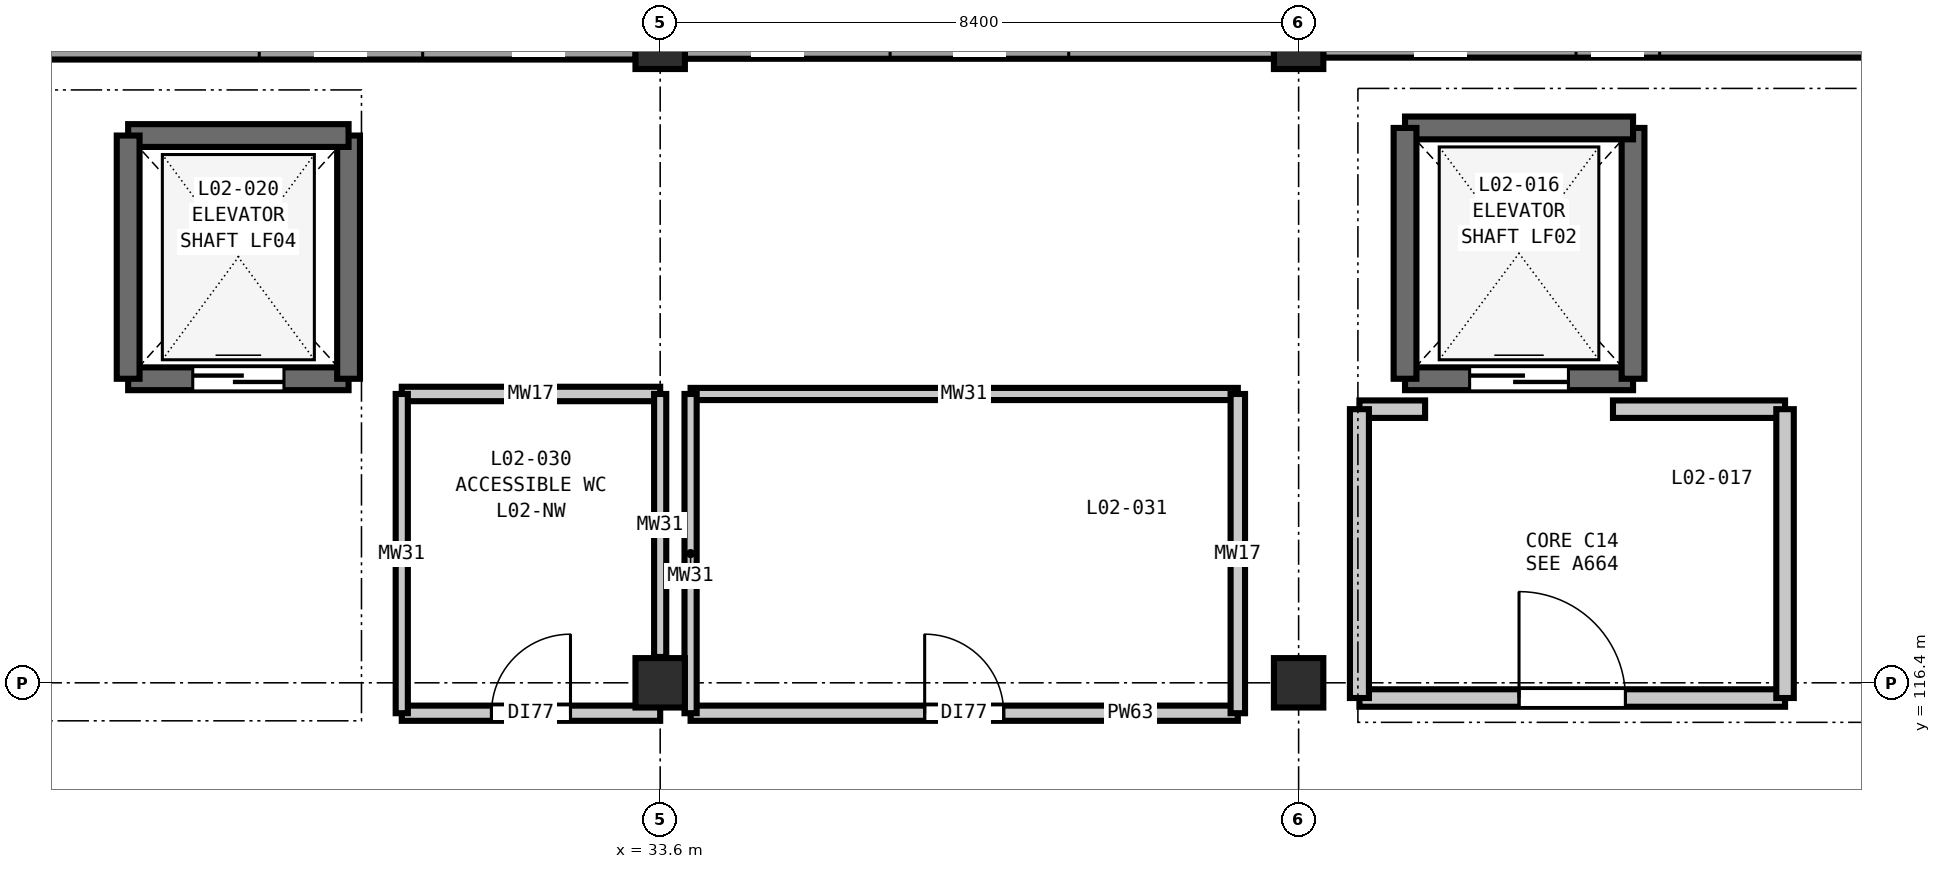
"""IFC4 building model, lengths in metres.
Left out: names, types, materials, properties, quantities, classifications, styles, units other than length and angle.
Written with IfcOpenShell. Run it as: python <this file> out.ifc"""

import sys

from ifc_helpers import new_model, si_unit, direction, frame, frame_2d, origin, origin_2d, place, context, subcontext, project, spatial, rectangle, extrude, element, fill, save


model = new_model("IFC4")
c1 = context("Model", 3, precision=1e-05, world=origin(), true_north=direction((0.0, 1.0)))
c2 = subcontext(c1, "Body", "Model", "MODEL_VIEW")
j1 = project(units=[si_unit("LENGTHUNIT", "METRE"), si_unit("PLANEANGLEUNIT", "RADIAN")], contexts=[c1])
p1 = place(None, origin())
s1 = spatial("IfcSite", under=j1, at=p1, CompositionType="ELEMENT")
p2 = place(p1, origin())
s2 = spatial("IfcBuilding", under=s1, at=p2, CompositionType="ELEMENT")
p3 = place(p2, frame((0.0, 0.0, 10.8)))
s3 = spatial("IfcBuildingStorey", under=s2, at=p3, CompositionType="ELEMENT", Elevation=10.8)
for number, where, z_axis, x_axis in (
    (1, (33.6, 116.4, 0.0), (0.0, 0.0, 1.0), (1.0, 0.0, 0.0)),
    (2, (33.6, 124.8, 0.0), (0.0, 0.0, 1.0), (1.0, 0.0, 0.0)),
    (3, (42.0, 116.4, 0.0), (0.0, 0.0, 1.0), (1.0, 0.0, 0.0)),
    (4, (42.0, 124.8, 0.0), (0.0, 0.0, 1.0), (1.0, 0.0, 0.0)),
):
    element("IfcColumn", number, at=place(p3, frame(where, z_axis=z_axis, x_axis=x_axis)), inside=s3, PredefinedType="COLUMN", context=c2, shape_type="SweptSolid", body=[
        extrude(rectangle(XDim=0.65, YDim=0.65, at=origin_2d()), origin(), (0.0, 0.0, 1.0), 5.4),
    ])
p4 = place(p3, frame((25.523, 124.8, 0.0), z_axis=(0.0, 0.0, 1.0), x_axis=(1.0, 0.0, 0.0)))
e5 = element("IfcWall", 5, at=p4, inside=s3, PredefinedType="SOLIDWALL", context=c2, shape_type="SweptSolid", body=[
    extrude(rectangle(XDim=7.754, YDim=0.4, at=frame_2d((3.877, 0.0))), origin(), (0.0, 0.0, 1.0), 4.68),
])
p5 = place(p4, frame((2.802, 0.0, 0.9)))
e6 = element("IfcOpeningElement", 6, at=p5, cuts=e5, PredefinedType="OPENING", context=c2, shape_type="SweptSolid", body=[
    extrude(rectangle(XDim=2.15, YDim=1.75, at=frame_2d((1.075, 0.875))), frame((0.0, 0.21, 0.0), z_axis=(0.0, -1.0, 0.0), x_axis=(1.0, 0.0, 0.0)), (0.0, 0.0, 1.0), 0.42),
])
p6 = place(p3, frame((33.923, 124.8, 0.0), z_axis=(0.0, 0.0, 1.0), x_axis=(1.0, 0.0, 0.0)))
e7 = element("IfcWall", 7, at=p6, inside=s3, PredefinedType="SOLIDWALL", context=c2, shape_type="SweptSolid", body=[
    extrude(rectangle(XDim=7.754, YDim=0.38, at=frame_2d((3.877, 0.0))), origin(), (0.0, 0.0, 1.0), 4.68),
])
p7 = place(p6, frame((2.702, 0.0, 0.9)))
e8 = element("IfcOpeningElement", 8, at=p7, cuts=e7, PredefinedType="OPENING", context=c2, shape_type="SweptSolid", body=[
    extrude(rectangle(XDim=2.35, YDim=1.75, at=frame_2d((1.175, 0.875))), frame((0.0, 0.2, 0.0), z_axis=(0.0, -1.0, 0.0), x_axis=(1.0, 0.0, 0.0)), (0.0, 0.0, 1.0), 0.4),
])
p8 = place(p3, frame((42.323, 124.8, 0.0), z_axis=(0.0, 0.0, 1.0), x_axis=(1.0, 0.0, 0.0)))
e9 = element("IfcWall", 9, at=p8, inside=s3, PredefinedType="SOLIDWALL", context=c2, shape_type="SweptSolid", body=[
    extrude(rectangle(XDim=7.754, YDim=0.35, at=frame_2d((3.877, 0.0))), origin(), (0.0, 0.0, 1.0), 4.68),
])
p9 = place(p8, frame((3.327, 0.0, 0.9)))
e10 = element("IfcOpeningElement", 10, at=p9, cuts=e9, PredefinedType="OPENING", context=c2, shape_type="SweptSolid", body=[
    extrude(rectangle(XDim=1.1, YDim=1.95, at=frame_2d((0.55, 0.975))), frame((0.0, 0.185, 0.0), z_axis=(0.0, -1.0, 0.0), x_axis=(1.0, 0.0, 0.0)), (0.0, 0.0, 1.0), 0.37),
])
p10 = place(p3, frame((43.4, 120.4, 0.0), z_axis=(0.0, 0.0, 1.0), x_axis=(1.0, 0.0, 0.0)))
e11 = element("IfcWall", 11, at=p10, inside=s3, PredefinedType="SHEAR", context=c2, shape_type="SweptSolid", body=[
    extrude(rectangle(XDim=3.0, YDim=0.3, at=frame_2d((1.5, 0.0))), origin(), (0.0, 0.0, 1.0), 5.4),
])
p11 = place(p10, frame((0.85, 0.0, 0.0)))
e12 = element("IfcOpeningElement", 12, at=p11, cuts=e11, PredefinedType="OPENING", context=c2, shape_type="SweptSolid", body=[
    extrude(rectangle(XDim=1.3, YDim=2.2, at=frame_2d((0.65, 1.1))), frame((0.0, 0.16, 0.0), z_axis=(0.0, -1.0, 0.0), x_axis=(1.0, 0.0, 0.0)), (0.0, 0.0, 1.0), 0.32),
])
p12 = place(p3, frame((46.4, 120.4, 0.0), z_axis=(0.0, 0.0, 1.0), x_axis=(0.0, 1.0, 0.0)))
e13 = element("IfcWall", 13, at=p12, inside=s3, PredefinedType="SHEAR", context=c2, shape_type="SweptSolid", body=[
    extrude(rectangle(XDim=3.3, YDim=0.3, at=frame_2d((1.65, 0.0))), origin(), (0.0, 0.0, 1.0), 5.4),
])
p13 = place(p3, frame((46.4, 123.7, 0.0), z_axis=(0.0, 0.0, 1.0), x_axis=(-1.0, 0.0, 0.0)))
e14 = element("IfcWall", 14, at=p13, inside=s3, PredefinedType="SHEAR", context=c2, shape_type="SweptSolid", body=[
    extrude(rectangle(XDim=3.0, YDim=0.3, at=frame_2d((1.5, 0.0))), origin(), (0.0, 0.0, 1.0), 5.4),
])
p14 = place(p3, frame((43.4, 123.7, 0.0), z_axis=(0.0, 0.0, 1.0), x_axis=(0.0, -1.0, 0.0)))
e15 = element("IfcWall", 15, at=p14, inside=s3, PredefinedType="SHEAR", context=c2, shape_type="SweptSolid", body=[
    extrude(rectangle(XDim=3.3, YDim=0.3, at=frame_2d((1.65, 0.0))), origin(), (0.0, 0.0, 1.0), 5.4),
])
p15 = place(p3, frame((26.6, 120.4, 0.0), z_axis=(0.0, 0.0, 1.0), x_axis=(1.0, 0.0, 0.0)))
e16 = element("IfcWall", 16, at=p15, inside=s3, PredefinedType="SHEAR", context=c2, shape_type="SweptSolid", body=[
    extrude(rectangle(XDim=2.9, YDim=0.3, at=frame_2d((1.45, 0.0))), origin(), (0.0, 0.0, 1.0), 5.4),
])
p16 = place(p15, frame((0.85, 0.0, 0.0)))
e17 = element("IfcOpeningElement", 17, at=p16, cuts=e16, PredefinedType="OPENING", context=c2, shape_type="SweptSolid", body=[
    extrude(rectangle(XDim=1.2, YDim=2.2, at=frame_2d((0.6, 1.1))), frame((0.0, 0.16, 0.0), z_axis=(0.0, -1.0, 0.0), x_axis=(1.0, 0.0, 0.0)), (0.0, 0.0, 1.0), 0.32),
])
p17 = place(p3, frame((29.5, 120.4, 0.0), z_axis=(0.0, 0.0, 1.0), x_axis=(0.0, 1.0, 0.0)))
e18 = element("IfcWall", 18, at=p17, inside=s3, PredefinedType="SHEAR", context=c2, shape_type="SweptSolid", body=[
    extrude(rectangle(XDim=3.2, YDim=0.3, at=frame_2d((1.6, 0.0))), origin(), (0.0, 0.0, 1.0), 5.4),
])
p18 = place(p3, frame((29.5, 123.6, 0.0), z_axis=(0.0, 0.0, 1.0), x_axis=(-1.0, 0.0, 0.0)))
e19 = element("IfcWall", 19, at=p18, inside=s3, PredefinedType="SHEAR", context=c2, shape_type="SweptSolid", body=[
    extrude(rectangle(XDim=2.9, YDim=0.3, at=frame_2d((1.45, 0.0))), origin(), (0.0, 0.0, 1.0), 5.4),
])
p19 = place(p3, frame((26.6, 123.6, 0.0), z_axis=(0.0, 0.0, 1.0), x_axis=(0.0, -1.0, 0.0)))
e20 = element("IfcWall", 20, at=p19, inside=s3, PredefinedType="SHEAR", context=c2, shape_type="SweptSolid", body=[
    extrude(rectangle(XDim=3.2, YDim=0.3, at=frame_2d((1.6, 0.0))), origin(), (0.0, 0.0, 1.0), 5.4),
])
p20 = place(p3, frame((30.2, 116.0, 0.0), z_axis=(0.0, 0.0, 1.0), x_axis=(1.0, 0.0, 0.0)))
e21 = element("IfcWall", 21, at=p20, inside=s3, PredefinedType="PARTITIONING", context=c2, shape_type="SweptSolid", body=[
    extrude(rectangle(XDim=3.4, YDim=0.2, at=frame_2d((1.7, 0.0))), origin(), (0.0, 0.0, 1.0), 5.07),
])
p21 = place(p20, frame((1.18, 0.0, 0.0)))
e22 = element("IfcOpeningElement", 22, at=p21, cuts=e21, PredefinedType="OPENING", context=c2, shape_type="SweptSolid", body=[
    extrude(rectangle(XDim=1.04, YDim=2.1, at=frame_2d((0.52, 1.05))), frame((0.0, 0.11, 0.0), z_axis=(0.0, -1.0, 0.0), x_axis=(1.0, 0.0, 0.0)), (0.0, 0.0, 1.0), 0.22),
])
p22 = place(p3, frame((34.0, 116.0, 0.0), z_axis=(0.0, 0.0, 1.0), x_axis=(1.0, 0.0, 0.0)))
e23 = element("IfcWall", 23, at=p22, inside=s3, PredefinedType="PARTITIONING", context=c2, shape_type="SweptSolid", body=[
    extrude(rectangle(XDim=7.2, YDim=0.2, at=frame_2d((3.6, 0.0))), origin(), (0.0, 0.0, 1.0), 5.07),
])
p23 = place(p22, frame((3.08, 0.0, 0.0)))
e24 = element("IfcOpeningElement", 24, at=p23, cuts=e23, PredefinedType="OPENING", context=c2, shape_type="SweptSolid", body=[
    extrude(rectangle(XDim=1.04, YDim=2.1, at=frame_2d((0.52, 1.05))), frame((0.0, 0.11, 0.0), z_axis=(0.0, -1.0, 0.0), x_axis=(1.0, 0.0, 0.0)), (0.0, 0.0, 1.0), 0.22),
])
p24 = place(p3, frame((42.8, 116.2, 0.0), z_axis=(0.0, 0.0, 1.0), x_axis=(1.0, 0.0, 0.0)))
e25 = element("IfcWall", 25, at=p24, inside=s3, PredefinedType="PARTITIONING", context=c2, shape_type="SweptSolid", body=[
    extrude(rectangle(XDim=5.6, YDim=0.23, at=frame_2d((2.8, 0.0))), origin(), (0.0, 0.0, 1.0), 4.735),
])
p25 = place(p24, frame((2.1, 0.0, 0.0)))
e26 = element("IfcOpeningElement", 26, at=p25, cuts=e25, PredefinedType="OPENING", context=c2, shape_type="SweptSolid", body=[
    extrude(rectangle(XDim=1.4, YDim=2.2, at=frame_2d((0.7, 1.1))), frame((0.0, 0.125, 0.0), z_axis=(0.0, -1.0, 0.0), x_axis=(1.0, 0.0, 0.0)), (0.0, 0.0, 1.0), 0.25),
])
p26 = place(p3, frame((46.136, 120.0, 0.0), z_axis=(0.0, 0.0, 1.0), x_axis=(1.0, 0.0, 0.0)))
e27 = element("IfcWall", 27, at=p26, inside=s3, PredefinedType="PARTITIONING", context=c2, shape_type="SweptSolid", body=[
    extrude(rectangle(XDim=2.264, YDim=0.23, at=frame_2d((1.132, 0.0))), origin(), (0.0, 0.0, 1.0), 5.07),
])
p27 = place(p3, frame((42.8, 120.0, 0.0), z_axis=(0.0, 0.0, 1.0), x_axis=(1.0, 0.0, 0.0)))
e28 = element("IfcWall", 28, at=p27, inside=s3, PredefinedType="PARTITIONING", context=c2, shape_type="SweptSolid", body=[
    extrude(rectangle(XDim=0.864, YDim=0.23, at=frame_2d((0.432, 0.0))), origin(), (0.0, 0.0, 1.0), 5.07),
])
p28 = place(p3, frame((30.2, 120.2, 0.0), z_axis=(0.0, 0.0, 1.0), x_axis=(1.0, 0.0, 0.0)))
e29 = element("IfcWall", 29, at=p28, inside=s3, PredefinedType="PLUMBINGWALL", context=c2, shape_type="SweptSolid", body=[
    extrude(rectangle(XDim=3.4, YDim=0.19, at=frame_2d((1.7, 0.0))), origin(), (0.0, 0.0, 1.0), 5.07),
])
p29 = place(p3, frame((34.0, 120.2, 0.0), z_axis=(0.0, 0.0, 1.0), x_axis=(1.0, 0.0, 0.0)))
e30 = element("IfcWall", 30, at=p29, inside=s3, PredefinedType="PLUMBINGWALL", context=c2, shape_type="SweptSolid", body=[
    extrude(rectangle(XDim=7.2, YDim=0.16, at=frame_2d((3.6, 0.0))), origin(), (0.0, 0.0, 1.0), 5.07),
])
p30 = place(p3, frame((30.2, 116.0, 0.0), z_axis=(0.0, 0.0, 1.0), x_axis=(0.0, 1.0, 0.0)))
e31 = element("IfcWall", 31, at=p30, inside=s3, PredefinedType="PLUMBINGWALL", context=c2, shape_type="SweptSolid", body=[
    extrude(rectangle(XDim=4.2, YDim=0.16, at=frame_2d((2.1, 0.0))), origin(), (0.0, 0.0, 1.0), 5.07),
])
p31 = place(p3, frame((33.6, 116.74, 0.0), z_axis=(0.0, 0.0, 1.0), x_axis=(0.0, 1.0, 0.0)))
e32 = element("IfcWall", 32, at=p31, inside=s3, PredefinedType="PLUMBINGWALL", context=c2, shape_type="SweptSolid", body=[
    extrude(rectangle(XDim=3.46, YDim=0.16, at=frame_2d((1.73, 0.0))), origin(), (0.0, 0.0, 1.0), 4.735),
])
p32 = place(p3, frame((34.0, 116.0, 0.0), z_axis=(0.0, 0.0, 1.0), x_axis=(0.0, 1.0, 0.0)))
e33 = element("IfcWall", 33, at=p32, inside=s3, PredefinedType="PLUMBINGWALL", context=c2, shape_type="SweptSolid", body=[
    extrude(rectangle(XDim=4.2, YDim=0.16, at=frame_2d((2.1, 0.0))), origin(), (0.0, 0.0, 1.0), 5.07),
])
p33 = place(p3, frame((41.2, 116.0, 0.0), z_axis=(0.0, 0.0, 1.0), x_axis=(0.0, 1.0, 0.0)))
e34 = element("IfcWall", 34, at=p33, inside=s3, PredefinedType="PLUMBINGWALL", context=c2, shape_type="SweptSolid", body=[
    extrude(rectangle(XDim=4.2, YDim=0.19, at=frame_2d((2.1, 0.0))), origin(), (0.0, 0.0, 1.0), 5.07),
])
p34 = place(p3, frame((42.8, 116.2, 0.0), z_axis=(0.0, 0.0, 1.0), x_axis=(0.0, 1.0, 0.0)))
e35 = element("IfcWall", 35, at=p34, inside=s3, PredefinedType="PARTITIONING", context=c2, shape_type="SweptSolid", body=[
    extrude(rectangle(XDim=3.8, YDim=0.25, at=frame_2d((1.9, 0.0))), origin(), (0.0, 0.0, 1.0), 5.07),
])
p35 = place(p3, frame((48.4, 116.2, 0.0), z_axis=(0.0, 0.0, 1.0), x_axis=(0.0, 1.0, 0.0)))
e36 = element("IfcWall", 36, at=p35, inside=s3, PredefinedType="PARTITIONING", context=c2, shape_type="SweptSolid", body=[
    extrude(rectangle(XDim=3.8, YDim=0.23, at=frame_2d((1.9, 0.0))), origin(), (0.0, 0.0, 1.0), 5.07),
])
p36 = place(p11, origin())
e37 = element("IfcDoor", 37, at=p36, inside=s3, OperationType="DOUBLE_DOOR_SLIDING", PredefinedType="DOOR", context=c2, shape_type="SweptSolid", body=[
    extrude(rectangle(XDim=1.3, YDim=2.2, at=frame_2d((0.65, 1.1))), frame((0.0, 0.025, 0.0), z_axis=(0.0, -1.0, 0.0), x_axis=(1.0, 0.0, 0.0)), (0.0, 0.0, 1.0), 0.05),
])
fill(e12, e37)
p37 = place(p16, origin())
e38 = element("IfcDoor", 38, at=p37, inside=s3, OperationType="DOUBLE_DOOR_SLIDING", PredefinedType="DOOR", context=c2, shape_type="SweptSolid", body=[
    extrude(rectangle(XDim=1.2, YDim=2.2, at=frame_2d((0.6, 1.1))), frame((0.0, 0.025, 0.0), z_axis=(0.0, -1.0, 0.0), x_axis=(1.0, 0.0, 0.0)), (0.0, 0.0, 1.0), 0.05),
])
fill(e17, e38)
p38 = place(p21, origin())
e39 = element("IfcDoor", 39, at=p38, inside=s3, OperationType="SINGLE_SWING_RIGHT", PredefinedType="DOOR", context=c2, shape_type="SweptSolid", body=[
    extrude(rectangle(XDim=1.04, YDim=2.1, at=frame_2d((0.52, 1.05))), frame((0.0, 0.025, 0.0), z_axis=(0.0, -1.0, 0.0), x_axis=(1.0, 0.0, 0.0)), (0.0, 0.0, 1.0), 0.05),
])
fill(e22, e39)
p39 = place(p23, origin())
e40 = element("IfcDoor", 40, at=p39, inside=s3, OperationType="SINGLE_SWING_LEFT", PredefinedType="DOOR", context=c2, shape_type="SweptSolid", body=[
    extrude(rectangle(XDim=1.04, YDim=2.1, at=frame_2d((0.52, 1.05))), frame((0.0, 0.025, 0.0), z_axis=(0.0, -1.0, 0.0), x_axis=(1.0, 0.0, 0.0)), (0.0, 0.0, 1.0), 0.05),
])
fill(e24, e40)
p40 = place(p25, origin())
e41 = element("IfcDoor", 41, at=p40, inside=s3, OperationType="SINGLE_SWING_LEFT", PredefinedType="DOOR", context=c2, shape_type="SweptSolid", body=[
    extrude(rectangle(XDim=1.4, YDim=2.2, at=frame_2d((0.7, 1.1))), frame((0.0, 0.025, 0.0), z_axis=(0.0, -1.0, 0.0), x_axis=(1.0, 0.0, 0.0)), (0.0, 0.0, 1.0), 0.05),
])
fill(e26, e41)
save(model, sys.argv[1])
